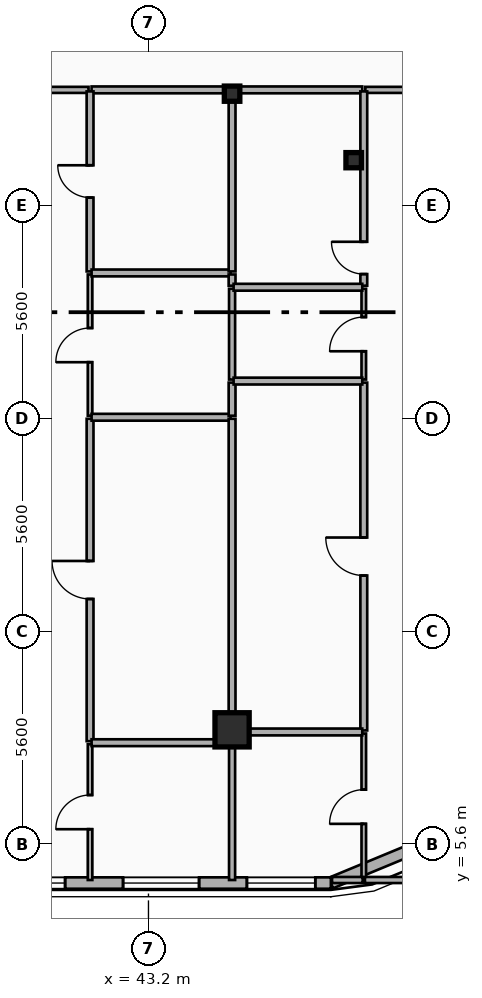
"""IFC4 building model, lengths in metres.
Left out: names, types, materials, properties, quantities, classifications, styles, units other than length and angle.
Written with IfcOpenShell. Run it as: python <this file> out.ifc"""

import sys

from ifc_helpers import new_model, si_unit, direction, frame, frame_2d, origin, origin_2d, place, context, subcontext, project, spatial, rectangle, i_section, extrude, element, fill, save


model = new_model("IFC4")
c1 = context("Model", 3, precision=1e-05, world=origin(), true_north=direction((0.0, 1.0)))
c2 = subcontext(c1, "Body", "Model", "MODEL_VIEW")
j1 = project(units=[si_unit("LENGTHUNIT", "METRE"), si_unit("PLANEANGLEUNIT", "RADIAN")], contexts=[c1])
p1 = place(None, origin())
s1 = spatial("IfcSite", under=j1, at=p1, CompositionType="ELEMENT")
p2 = place(p1, origin())
s2 = spatial("IfcBuilding", under=s1, at=p2, CompositionType="ELEMENT")
p3 = place(p2, frame((0.0, 0.0, 193.2)))
s3 = spatial("IfcBuildingStorey", under=s2, at=p3, CompositionType="ELEMENT", Elevation=193.2)
p4 = place(p3, frame((45.4, 25.35, 0.0), z_axis=(0.0, 0.0, 1.0), x_axis=(1.0, 0.0, 0.0)))
e1 = element("IfcColumn", 1, at=p4, inside=s3, PredefinedType="COLUMN", context=c2, shape_type="SweptSolid", body=[
    extrude(i_section(OverallWidth=0.408, OverallDepth=0.4, WebThickness=0.025, FlangeThickness=0.039, FilletRadius=0.015, at=origin_2d()), origin(), (0.0, 0.0, 1.0), 3.6),
])
p5 = place(p3, frame((45.4, 8.72, 0.0), z_axis=(0.0, -0.090231265542, 0.995920839584), x_axis=(1.0, 0.0, 0.0)))
e2 = element("IfcColumn", 2, at=p5, inside=s3, PredefinedType="COLUMN", context=c2, shape_type="SweptSolid", body=[
    extrude(rectangle(XDim=0.9, YDim=0.9, at=origin_2d()), origin(), (0.0, 0.0, 1.0), 3.615),
])
p6 = place(p3, frame((48.6, 23.6, 0.0), z_axis=(0.0, 0.0, 1.0), x_axis=(1.0, 0.0, 0.0)))
e3 = element("IfcColumn", 3, at=p6, inside=s3, PredefinedType="COLUMN", context=c2, shape_type="SweptSolid", body=[
    extrude(i_section(OverallWidth=0.408, OverallDepth=0.4, WebThickness=0.025, FlangeThickness=0.039, FilletRadius=0.015, at=origin_2d()), origin(), (0.0, 0.0, 1.0), 3.6),
])
p7 = place(p3, frame((50.843, 5.757, 0.0), z_axis=(0.0, 0.0, 1.0), x_axis=(-0.92389884758, -0.382636798336, 0.0)))
e4 = element("IfcWall", 4, at=p7, inside=s3, PredefinedType="SOLIDWALL", context=c2, shape_type="SweptSolid", body=[
    extrude(rectangle(XDim=3.077, YDim=0.3, at=frame_2d((1.538, 0.0))), origin(), (0.0, 0.0, 1.0), 3.34),
])
p8 = place(p3, frame((48.0, 4.58, 0.0), z_axis=(0.0, 0.0, 1.0), x_axis=(-1.0, 0.0, 0.0)))
e5 = element("IfcWall", 5, at=p8, inside=s3, PredefinedType="SOLIDWALL", context=c2, shape_type="SweptSolid", body=[
    extrude(rectangle(XDim=38.4, YDim=0.3, at=frame_2d((19.2, 0.0))), origin(), (0.0, 0.0, 1.0), 3.34),
])
p9 = place(p8, frame((36.19, 0.0, 0.8)))
e6 = element("IfcOpeningElement", 6, at=p9, cuts=e5, PredefinedType="OPENING", context=c2, shape_type="SweptSolid", body=[
    extrude(rectangle(XDim=1.8, YDim=1.8, at=frame_2d((0.9, 0.9))), frame((0.0, 0.16, 0.0), z_axis=(0.0, -1.0, 0.0), x_axis=(1.0, 0.0, 0.0)), (0.0, 0.0, 1.0), 0.32),
])
p10 = place(p8, frame((29.712, 0.0, 0.7)))
e7 = element("IfcOpeningElement", 7, at=p10, cuts=e5, PredefinedType="OPENING", context=c2, shape_type="SweptSolid", body=[
    extrude(rectangle(XDim=2.0, YDim=2.2, at=frame_2d((1.0, 1.1))), frame((0.0, 0.16, 0.0), z_axis=(0.0, -1.0, 0.0), x_axis=(1.0, 0.0, 0.0)), (0.0, 0.0, 1.0), 0.32),
])
p11 = place(p8, frame((33.038, 0.0, 0.7)))
e8 = element("IfcOpeningElement", 8, at=p11, cuts=e5, PredefinedType="OPENING", context=c2, shape_type="SweptSolid", body=[
    extrude(rectangle(XDim=2.0, YDim=2.2, at=frame_2d((1.0, 1.1))), frame((0.0, 0.16, 0.0), z_axis=(0.0, -1.0, 0.0), x_axis=(1.0, 0.0, 0.0)), (0.0, 0.0, 1.0), 0.32),
])
p12 = place(p8, frame((20.0, 0.0, 0.7)))
e9 = element("IfcOpeningElement", 9, at=p12, cuts=e5, PredefinedType="OPENING", context=c2, shape_type="SweptSolid", body=[
    extrude(rectangle(XDim=2.0, YDim=2.2, at=frame_2d((1.0, 1.1))), frame((0.0, 0.16, 0.0), z_axis=(0.0, -1.0, 0.0), x_axis=(1.0, 0.0, 0.0)), (0.0, 0.0, 1.0), 0.32),
])
p13 = place(p8, frame((25.2, 0.0, 0.7)))
e10 = element("IfcOpeningElement", 10, at=p13, cuts=e5, PredefinedType="OPENING", context=c2, shape_type="SweptSolid", body=[
    extrude(rectangle(XDim=2.0, YDim=2.2, at=frame_2d((1.0, 1.1))), frame((0.0, 0.16, 0.0), z_axis=(0.0, -1.0, 0.0), x_axis=(1.0, 0.0, 0.0)), (0.0, 0.0, 1.0), 0.32),
])
p14 = place(p8, frame((13.4, 0.0, 0.7)))
e11 = element("IfcOpeningElement", 11, at=p14, cuts=e5, PredefinedType="OPENING", context=c2, shape_type="SweptSolid", body=[
    extrude(rectangle(XDim=2.0, YDim=2.2, at=frame_2d((1.0, 1.1))), frame((0.0, 0.16, 0.0), z_axis=(0.0, -1.0, 0.0), x_axis=(1.0, 0.0, 0.0)), (0.0, 0.0, 1.0), 0.32),
])
p15 = place(p8, frame((6.993, 0.0, 0.7)))
e12 = element("IfcOpeningElement", 12, at=p15, cuts=e5, PredefinedType="OPENING", context=c2, shape_type="SweptSolid", body=[
    extrude(rectangle(XDim=2.0, YDim=2.2, at=frame_2d((1.0, 1.1))), frame((0.0, 0.16, 0.0), z_axis=(0.0, -1.0, 0.0), x_axis=(1.0, 0.0, 0.0)), (0.0, 0.0, 1.0), 0.32),
])
p16 = place(p8, frame((3.469, 0.0, 0.7)))
e13 = element("IfcOpeningElement", 13, at=p16, cuts=e5, PredefinedType="OPENING", context=c2, shape_type="SweptSolid", body=[
    extrude(rectangle(XDim=2.0, YDim=2.2, at=frame_2d((1.0, 1.1))), frame((0.0, 0.16, 0.0), z_axis=(0.0, -1.0, 0.0), x_axis=(1.0, 0.0, 0.0)), (0.0, 0.0, 1.0), 0.32),
])
p17 = place(p8, frame((0.41, 0.0, 0.8)))
e14 = element("IfcOpeningElement", 14, at=p17, cuts=e5, PredefinedType="OPENING", context=c2, shape_type="SweptSolid", body=[
    extrude(rectangle(XDim=1.8, YDim=1.8, at=frame_2d((0.9, 0.9))), frame((0.0, 0.16, 0.0), z_axis=(0.0, -1.0, 0.0), x_axis=(1.0, 0.0, 0.0)), (0.0, 0.0, 1.0), 0.32),
])
p18 = place(p3, frame((38.39, 25.45, 0.0), z_axis=(0.0, 0.0, 1.0), x_axis=(1.0, 0.0, 0.0)))
e15 = element("IfcWall", 15, at=p18, inside=s3, PredefinedType="PARTITIONING", context=c2, shape_type="SweptSolid", body=[
    extrude(rectangle(XDim=3.233, YDim=0.16, at=frame_2d((1.617, 0.0))), origin(), (0.0, 0.0, 1.0), 3.34),
])
p19 = place(p18, frame((1.116, 0.0, 0.0)))
e16 = element("IfcOpeningElement", 16, at=p19, cuts=e15, PredefinedType="OPENING", context=c2, shape_type="SweptSolid", body=[
    extrude(rectangle(XDim=1.0, YDim=2.15, at=frame_2d((0.5, 1.075))), frame((0.0, 0.09, 0.0), z_axis=(0.0, -1.0, 0.0), x_axis=(1.0, 0.0, 0.0)), (0.0, 0.0, 1.0), 0.18),
])
p20 = place(p3, frame((41.703, 25.45, 0.0), z_axis=(0.0, 0.0, 1.0), x_axis=(1.0, 0.0, 0.0)))
e17 = element("IfcWall", 17, at=p20, inside=s3, PredefinedType="PLUMBINGWALL", context=c2, shape_type="SweptSolid", body=[
    extrude(rectangle(XDim=3.657, YDim=0.18, at=frame_2d((1.829, 0.0))), origin(), (0.0, 0.0, 1.0), 2.42),
])
p21 = place(p3, frame((48.906, 25.45, 0.0), z_axis=(0.0, 0.0, 1.0), x_axis=(1.0, 0.0, 0.0)))
e18 = element("IfcWall", 18, at=p21, inside=s3, PredefinedType="PARTITIONING", context=c2, shape_type="SweptSolid", body=[
    extrude(rectangle(XDim=3.034, YDim=0.16, at=frame_2d((1.517, 0.0))), origin(), (0.0, 0.0, 1.0), 2.67),
])
p22 = place(p21, frame((1.017, 0.0, 0.0)))
e19 = element("IfcOpeningElement", 19, at=p22, cuts=e18, PredefinedType="OPENING", context=c2, shape_type="SweptSolid", body=[
    extrude(rectangle(XDim=1.0, YDim=2.15, at=frame_2d((0.5, 1.075))), frame((0.0, 0.09, 0.0), z_axis=(0.0, -1.0, 0.0), x_axis=(1.0, 0.0, 0.0)), (0.0, 0.0, 1.0), 0.18),
])
p23 = place(p3, frame((45.44, 25.45, 0.0), z_axis=(0.0, 0.0, 1.0), x_axis=(1.0, 0.0, 0.0)))
e20 = element("IfcWall", 20, at=p23, inside=s3, PredefinedType="PLUMBINGWALL", context=c2, shape_type="SweptSolid", body=[
    extrude(rectangle(XDim=3.386, YDim=0.18, at=frame_2d((1.693, 0.0))), origin(), (0.0, 0.0, 1.0), 2.42),
])
p24 = place(p3, frame((41.663, 4.66, 0.0), z_axis=(0.0, 0.0, 1.0), x_axis=(0.0, 1.0, 0.0)))
e21 = element("IfcWall", 21, at=p24, inside=s3, PredefinedType="PARTITIONING", context=c2, shape_type="SweptSolid", body=[
    extrude(rectangle(XDim=3.573, YDim=0.12, at=frame_2d((1.787, 0.0))), origin(), (0.0, 0.0, 1.0), 3.0),
])
p25 = place(p24, frame((1.336, 0.0, 0.0)))
e22 = element("IfcOpeningElement", 22, at=p25, cuts=e21, PredefinedType="OPENING", context=c2, shape_type="SweptSolid", body=[
    extrude(rectangle(XDim=0.9, YDim=2.1, at=frame_2d((0.45, 1.05))), frame((0.0, 0.07, 0.0), z_axis=(0.0, -1.0, 0.0), x_axis=(1.0, 0.0, 0.0)), (0.0, 0.0, 1.0), 0.14),
])
p26 = place(p3, frame((41.663, 8.313, 0.0), z_axis=(0.0, 0.0, 1.0), x_axis=(0.0, 1.0, 0.0)))
e23 = element("IfcWall", 23, at=p26, inside=s3, PredefinedType="PLUMBINGWALL", context=c2, shape_type="SweptSolid", body=[
    extrude(rectangle(XDim=8.483, YDim=0.18, at=frame_2d((4.241, 0.0))), origin(), (0.0, 0.0, 1.0), 2.87),
])
p27 = place(p26, frame((3.741, 0.0, 0.0)))
e24 = element("IfcOpeningElement", 24, at=p27, cuts=e23, PredefinedType="OPENING", context=c2, shape_type="SweptSolid", body=[
    extrude(rectangle(XDim=1.0, YDim=2.15, at=frame_2d((0.5, 1.075))), frame((0.0, 0.1, 0.0), z_axis=(0.0, -1.0, 0.0), x_axis=(1.0, 0.0, 0.0)), (0.0, 0.0, 1.0), 0.2),
])
p28 = place(p3, frame((41.663, 16.876, 0.0), z_axis=(0.0, 0.0, 1.0), x_axis=(0.0, 1.0, 0.0)))
e25 = element("IfcWall", 25, at=p28, inside=s3, PredefinedType="PARTITIONING", context=c2, shape_type="SweptSolid", body=[
    extrude(rectangle(XDim=3.717, YDim=0.12, at=frame_2d((1.858, 0.0))), origin(), (0.0, 0.0, 1.0), 2.87),
])
p29 = place(p28, frame((1.408, 0.0, 0.0)))
e26 = element("IfcOpeningElement", 26, at=p29, cuts=e25, PredefinedType="OPENING", context=c2, shape_type="SweptSolid", body=[
    extrude(rectangle(XDim=0.9, YDim=2.1, at=frame_2d((0.45, 1.05))), frame((0.0, 0.07, 0.0), z_axis=(0.0, -1.0, 0.0), x_axis=(1.0, 0.0, 0.0)), (0.0, 0.0, 1.0), 0.14),
])
p30 = place(p3, frame((41.663, 20.673, 0.0), z_axis=(0.0, 0.0, 1.0), x_axis=(0.0, 1.0, 0.0)))
e27 = element("IfcWall", 27, at=p30, inside=s3, PredefinedType="PLUMBINGWALL", context=c2, shape_type="SweptSolid", body=[
    extrude(rectangle(XDim=4.737, YDim=0.18, at=frame_2d((2.368, 0.0))), origin(), (0.0, 0.0, 1.0), 2.88),
])
p31 = place(p30, frame((1.944, 0.0, 0.0)))
e28 = element("IfcOpeningElement", 28, at=p31, cuts=e27, PredefinedType="OPENING", context=c2, shape_type="SweptSolid", body=[
    extrude(rectangle(XDim=0.85, YDim=2.1, at=frame_2d((0.425, 1.05))), frame((0.0, 0.1, 0.0), z_axis=(0.0, -1.0, 0.0), x_axis=(1.0, 0.0, 0.0)), (0.0, 0.0, 1.0), 0.2),
])
p32 = place(p3, frame((41.703, 8.273, 0.0), z_axis=(0.0, 0.0, 1.0), x_axis=(1.0, 0.0, 0.0)))
e29 = element("IfcWall", 29, at=p32, inside=s3, PredefinedType="PLUMBINGWALL", context=c2, shape_type="SweptSolid", body=[
    extrude(rectangle(XDim=3.657, YDim=0.18, at=frame_2d((1.829, 0.0))), origin(), (0.0, 0.0, 1.0), 2.42),
])
p33 = place(p3, frame((45.4, 4.66, 0.0), z_axis=(0.0, 0.0, 1.0), x_axis=(0.0, 1.0, 0.0)))
e30 = element("IfcWall", 30, at=p33, inside=s3, PredefinedType="PARTITIONING", context=c2, shape_type="SweptSolid", body=[
    extrude(rectangle(XDim=3.573, YDim=0.16, at=frame_2d((1.787, 0.0))), origin(), (0.0, 0.0, 1.0), 2.42),
])
p34 = place(p3, frame((41.703, 16.836, 0.0), z_axis=(0.0, 0.0, 1.0), x_axis=(1.0, 0.0, 0.0)))
e31 = element("IfcWall", 31, at=p34, inside=s3, PredefinedType="PLUMBINGWALL", context=c2, shape_type="SweptSolid", body=[
    extrude(rectangle(XDim=3.657, YDim=0.18, at=frame_2d((1.829, 0.0))), origin(), (0.0, 0.0, 1.0), 2.42),
])
p35 = place(p3, frame((45.4, 8.595, 0.0), z_axis=(0.0, 0.0, 1.0), x_axis=(0.0, 1.0, 0.0)))
e32 = element("IfcWall", 32, at=p35, inside=s3, PredefinedType="PLUMBINGWALL", context=c2, shape_type="SweptSolid", body=[
    extrude(rectangle(XDim=8.201, YDim=0.18, at=frame_2d((4.101, 0.0))), origin(), (0.0, 0.0, 1.0), 2.42),
])
p36 = place(p3, frame((41.703, 20.633, 0.0), z_axis=(0.0, 0.0, 1.0), x_axis=(1.0, 0.0, 0.0)))
e33 = element("IfcWall", 33, at=p36, inside=s3, PredefinedType="PLUMBINGWALL", context=c2, shape_type="SweptSolid", body=[
    extrude(rectangle(XDim=3.657, YDim=0.18, at=frame_2d((1.829, 0.0))), origin(), (0.0, 0.0, 1.0), 2.42),
])
p37 = place(p3, frame((45.4, 16.876, 0.0), z_axis=(0.0, 0.0, 1.0), x_axis=(0.0, 1.0, 0.0)))
e34 = element("IfcWall", 34, at=p37, inside=s3, PredefinedType="PLUMBINGWALL", context=c2, shape_type="SweptSolid", body=[
    extrude(rectangle(XDim=0.872, YDim=0.18, at=frame_2d((0.436, 0.0))), origin(), (0.0, 0.0, 1.0), 2.42),
])
p38 = place(p3, frame((45.4, 17.828, 0.0), z_axis=(0.0, 0.0, 1.0), x_axis=(0.0, 1.0, 0.0)))
e35 = element("IfcWall", 35, at=p38, inside=s3, PredefinedType="PARTITIONING", context=c2, shape_type="SweptSolid", body=[
    extrude(rectangle(XDim=2.389, YDim=0.16, at=frame_2d((1.195, 0.0))), origin(), (0.0, 0.0, 1.0), 2.42),
])
p39 = place(p3, frame((45.4, 20.297, 0.0), z_axis=(0.0, 0.0, 1.0), x_axis=(0.0, 1.0, 0.0)))
e36 = element("IfcWall", 36, at=p39, inside=s3, PredefinedType="PLUMBINGWALL", context=c2, shape_type="SweptSolid", body=[
    extrude(rectangle(XDim=0.296, YDim=0.18, at=frame_2d((0.148, 0.0))), origin(), (0.0, 0.0, 1.0), 2.42),
])
p40 = place(p3, frame((45.4, 20.673, 0.0), z_axis=(0.0, 0.0, 1.0), x_axis=(0.0, 1.0, 0.0)))
e37 = element("IfcWall", 37, at=p40, inside=s3, PredefinedType="PLUMBINGWALL", context=c2, shape_type="SweptSolid", body=[
    extrude(rectangle(XDim=4.737, YDim=0.18, at=frame_2d((2.368, 0.0))), origin(), (0.0, 0.0, 1.0), 2.42),
])
p41 = place(p3, frame((48.866, 4.66, 0.0), z_axis=(0.0, 0.0, 1.0), x_axis=(0.0, 1.0, 0.0)))
e38 = element("IfcWall", 38, at=p41, inside=s3, PredefinedType="PARTITIONING", context=c2, shape_type="SweptSolid", body=[
    extrude(rectangle(XDim=3.855, YDim=0.12, at=frame_2d((1.927, 0.0))), origin(), (0.0, 0.0, 1.0), 3.34),
])
p42 = place(p41, frame((1.478, 0.0, 0.0)))
e39 = element("IfcOpeningElement", 39, at=p42, cuts=e38, PredefinedType="OPENING", context=c2, shape_type="SweptSolid", body=[
    extrude(rectangle(XDim=0.9, YDim=2.1, at=frame_2d((0.45, 1.05))), frame((0.0, 0.07, 0.0), z_axis=(0.0, -1.0, 0.0), x_axis=(1.0, 0.0, 0.0)), (0.0, 0.0, 1.0), 0.14),
])
p43 = place(p3, frame((48.866, 8.595, 0.0), z_axis=(0.0, 0.0, 1.0), x_axis=(0.0, 1.0, 0.0)))
e40 = element("IfcWall", 40, at=p43, inside=s3, PredefinedType="PLUMBINGWALL", context=c2, shape_type="SweptSolid", body=[
    extrude(rectangle(XDim=9.153, YDim=0.18, at=frame_2d((4.577, 0.0))), origin(), (0.0, 0.0, 1.0), 2.82),
])
p44 = place(p43, frame((4.076, 0.0, 0.0)))
e41 = element("IfcOpeningElement", 41, at=p44, cuts=e40, PredefinedType="OPENING", context=c2, shape_type="SweptSolid", body=[
    extrude(rectangle(XDim=1.0, YDim=2.15, at=frame_2d((0.5, 1.075))), frame((0.0, 0.1, 0.0), z_axis=(0.0, -1.0, 0.0), x_axis=(1.0, 0.0, 0.0)), (0.0, 0.0, 1.0), 0.2),
])
p45 = place(p3, frame((48.866, 17.828, 0.0), z_axis=(0.0, 0.0, 1.0), x_axis=(0.0, 1.0, 0.0)))
e42 = element("IfcWall", 42, at=p45, inside=s3, PredefinedType="PARTITIONING", context=c2, shape_type="SweptSolid", body=[
    extrude(rectangle(XDim=2.389, YDim=0.12, at=frame_2d((1.195, 0.0))), origin(), (0.0, 0.0, 1.0), 2.82),
])
p46 = place(p45, frame((0.744, 0.0, 0.0)))
e43 = element("IfcOpeningElement", 43, at=p46, cuts=e42, PredefinedType="OPENING", context=c2, shape_type="SweptSolid", body=[
    extrude(rectangle(XDim=0.9, YDim=2.1, at=frame_2d((0.45, 1.05))), frame((0.0, 0.07, 0.0), z_axis=(0.0, -1.0, 0.0), x_axis=(1.0, 0.0, 0.0)), (0.0, 0.0, 1.0), 0.14),
])
p47 = place(p3, frame((48.866, 20.297, 0.0), z_axis=(0.0, 0.0, 1.0), x_axis=(0.0, 1.0, 0.0)))
e44 = element("IfcWall", 44, at=p47, inside=s3, PredefinedType="PLUMBINGWALL", context=c2, shape_type="SweptSolid", body=[
    extrude(rectangle(XDim=5.113, YDim=0.18, at=frame_2d((2.556, 0.0))), origin(), (0.0, 0.0, 1.0), 2.82),
])
p48 = place(p47, frame((0.306, 0.0, 0.0)))
e45 = element("IfcOpeningElement", 45, at=p48, cuts=e44, PredefinedType="OPENING", context=c2, shape_type="SweptSolid", body=[
    extrude(rectangle(XDim=0.85, YDim=2.1, at=frame_2d((0.425, 1.05))), frame((0.0, 0.1, 0.0), z_axis=(0.0, -1.0, 0.0), x_axis=(1.0, 0.0, 0.0)), (0.0, 0.0, 1.0), 0.2),
])
for number, where, z_axis, x_axis in (
    (46, (45.44, 8.555, 0.0), (0.0, 0.0, 1.0), (1.0, 0.0, 0.0)),
    (47, (45.44, 17.788, 0.0), (0.0, 0.0, 1.0), (1.0, 0.0, 0.0)),
    (48, (45.44, 20.257, 0.0), (0.0, 0.0, 1.0), (1.0, 0.0, 0.0)),
):
    element("IfcWall", number, at=place(p3, frame(where, z_axis=z_axis, x_axis=x_axis)), inside=s3, PredefinedType="PLUMBINGWALL", context=c2, shape_type="SweptSolid", body=[
        extrude(rectangle(XDim=3.386, YDim=0.18, at=frame_2d((1.693, 0.0))), origin(), (0.0, 0.0, 1.0), 2.42),
    ])
p49 = place(p3, frame((48.896, 4.66, 0.0), z_axis=(0.0, 0.0, 1.0), x_axis=(1.0, 0.0, 0.0)))
e49 = element("IfcWall", 49, at=p49, inside=s3, PredefinedType="PARTITIONING", context=c2, shape_type="SweptSolid", body=[
    extrude(rectangle(XDim=3.014, YDim=0.16, at=frame_2d((1.507, 0.0))), origin(), (0.0, 0.0, 1.0), 3.34),
])
p50 = place(p3, frame((48.03, 4.66, 0.0), z_axis=(0.0, 0.0, 1.0), x_axis=(1.0, 0.0, 0.0)))
e50 = element("IfcWall", 50, at=p50, inside=s3, PredefinedType="PARTITIONING", context=c2, shape_type="SweptSolid", body=[
    extrude(rectangle(XDim=0.806, YDim=0.16, at=frame_2d((0.403, 0.0))), origin(), (0.0, 0.0, 1.0), 3.34),
])
p51 = place(p15, origin())
e51 = element("IfcWindow", 51, at=p51, inside=s3, PartitioningType="SINGLE_PANEL", PredefinedType="WINDOW", context=c2, shape_type="SweptSolid", body=[
    extrude(rectangle(XDim=2.0, YDim=2.2, at=frame_2d((1.0, 1.1))), frame((0.0, 0.03, 0.0), z_axis=(0.0, -1.0, 0.0), x_axis=(1.0, 0.0, 0.0)), (0.0, 0.0, 1.0), 0.06),
])
fill(e12, e51)
p52 = place(p16, origin())
e52 = element("IfcWindow", 52, at=p52, inside=s3, PartitioningType="SINGLE_PANEL", PredefinedType="WINDOW", context=c2, shape_type="SweptSolid", body=[
    extrude(rectangle(XDim=2.0, YDim=2.2, at=frame_2d((1.0, 1.1))), frame((0.0, 0.03, 0.0), z_axis=(0.0, -1.0, 0.0), x_axis=(1.0, 0.0, 0.0)), (0.0, 0.0, 1.0), 0.06),
])
fill(e13, e52)
p53 = place(p17, origin())
e53 = element("IfcWindow", 53, at=p53, inside=s3, PartitioningType="SINGLE_PANEL", PredefinedType="WINDOW", context=c2, shape_type="SweptSolid", body=[
    extrude(rectangle(XDim=1.8, YDim=1.8, at=frame_2d((0.9, 0.9))), frame((0.0, 0.03, 0.0), z_axis=(0.0, -1.0, 0.0), x_axis=(1.0, 0.0, 0.0)), (0.0, 0.0, 1.0), 0.06),
])
fill(e14, e53)
p54 = place(p25, origin())
e54 = element("IfcDoor", 54, at=p54, inside=s3, OperationType="SINGLE_SWING_LEFT", PredefinedType="DOOR", context=c2, shape_type="SweptSolid", body=[
    extrude(rectangle(XDim=0.9, YDim=2.1, at=frame_2d((0.45, 1.05))), frame((0.0, 0.025, 0.0), z_axis=(0.0, -1.0, 0.0), x_axis=(1.0, 0.0, 0.0)), (0.0, 0.0, 1.0), 0.05),
])
fill(e22, e54)
p55 = place(p27, origin())
e55 = element("IfcDoor", 55, at=p55, inside=s3, OperationType="SINGLE_SWING_RIGHT", PredefinedType="DOOR", context=c2, shape_type="SweptSolid", body=[
    extrude(rectangle(XDim=1.0, YDim=2.15, at=frame_2d((0.5, 1.075))), frame((0.0, 0.025, 0.0), z_axis=(0.0, -1.0, 0.0), x_axis=(1.0, 0.0, 0.0)), (0.0, 0.0, 1.0), 0.05),
])
fill(e24, e55)
p56 = place(p29, origin())
e56 = element("IfcDoor", 56, at=p56, inside=s3, OperationType="SINGLE_SWING_LEFT", PredefinedType="DOOR", context=c2, shape_type="SweptSolid", body=[
    extrude(rectangle(XDim=0.9, YDim=2.1, at=frame_2d((0.45, 1.05))), frame((0.0, 0.025, 0.0), z_axis=(0.0, -1.0, 0.0), x_axis=(1.0, 0.0, 0.0)), (0.0, 0.0, 1.0), 0.05),
])
fill(e26, e56)
p57 = place(p31, origin())
e57 = element("IfcDoor", 57, at=p57, inside=s3, OperationType="SINGLE_SWING_RIGHT", PredefinedType="DOOR", context=c2, shape_type="SweptSolid", body=[
    extrude(rectangle(XDim=0.85, YDim=2.1, at=frame_2d((0.425, 1.05))), frame((0.0, 0.025, 0.0), z_axis=(0.0, -1.0, 0.0), x_axis=(1.0, 0.0, 0.0)), (0.0, 0.0, 1.0), 0.05),
])
fill(e28, e57)
p58 = place(p42, origin())
e58 = element("IfcDoor", 58, at=p58, inside=s3, OperationType="SINGLE_SWING_LEFT", PredefinedType="DOOR", context=c2, shape_type="SweptSolid", body=[
    extrude(rectangle(XDim=0.9, YDim=2.1, at=frame_2d((0.45, 1.05))), frame((0.0, 0.025, 0.0), z_axis=(0.0, -1.0, 0.0), x_axis=(1.0, 0.0, 0.0)), (0.0, 0.0, 1.0), 0.05),
])
fill(e39, e58)
p59 = place(p44, origin())
e59 = element("IfcDoor", 59, at=p59, inside=s3, OperationType="SINGLE_SWING_RIGHT", PredefinedType="DOOR", context=c2, shape_type="SweptSolid", body=[
    extrude(rectangle(XDim=1.0, YDim=2.15, at=frame_2d((0.5, 1.075))), frame((0.0, 0.025, 0.0), z_axis=(0.0, -1.0, 0.0), x_axis=(1.0, 0.0, 0.0)), (0.0, 0.0, 1.0), 0.05),
])
fill(e41, e59)
p60 = place(p46, origin())
e60 = element("IfcDoor", 60, at=p60, inside=s3, OperationType="SINGLE_SWING_LEFT", PredefinedType="DOOR", context=c2, shape_type="SweptSolid", body=[
    extrude(rectangle(XDim=0.9, YDim=2.1, at=frame_2d((0.45, 1.05))), frame((0.0, 0.025, 0.0), z_axis=(0.0, -1.0, 0.0), x_axis=(1.0, 0.0, 0.0)), (0.0, 0.0, 1.0), 0.05),
])
fill(e43, e60)
p61 = place(p48, origin())
e61 = element("IfcDoor", 61, at=p61, inside=s3, OperationType="SINGLE_SWING_RIGHT", PredefinedType="DOOR", context=c2, shape_type="SweptSolid", body=[
    extrude(rectangle(XDim=0.85, YDim=2.1, at=frame_2d((0.425, 1.05))), frame((0.0, 0.025, 0.0), z_axis=(0.0, -1.0, 0.0), x_axis=(1.0, 0.0, 0.0)), (0.0, 0.0, 1.0), 0.05),
])
fill(e45, e61)
save(model, sys.argv[1])
